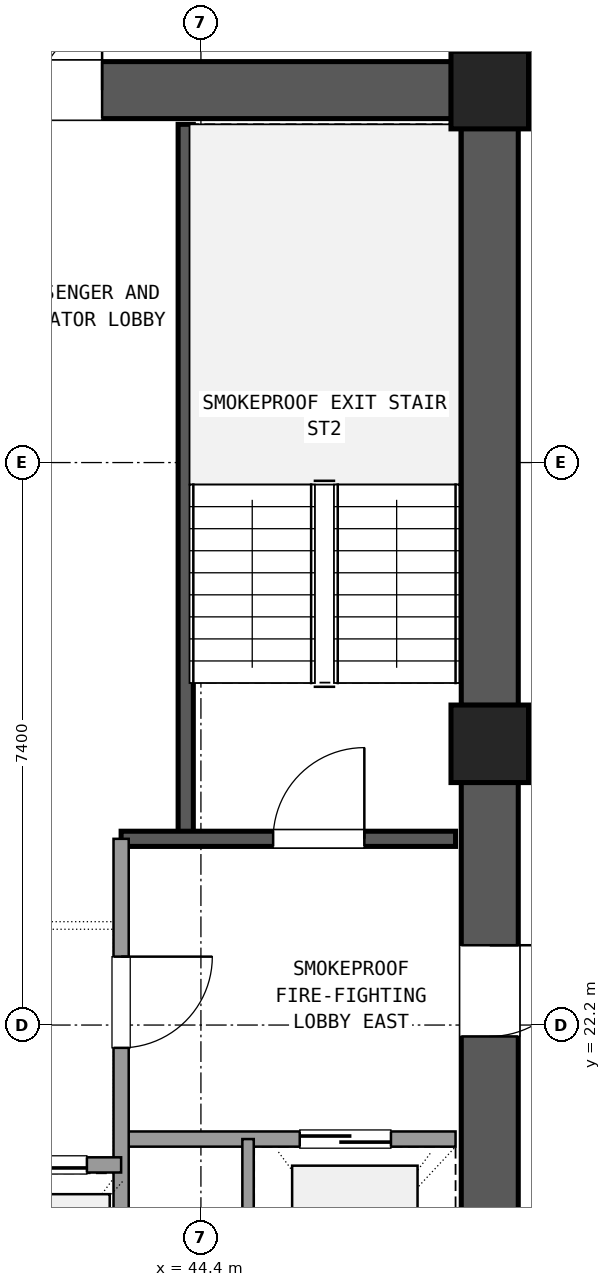
"""IFC4 building model, lengths in metres.
Left out: names, types, materials, properties, quantities, classifications, styles, units other than length and angle.
Written with IfcOpenShell. Run it as: python <this file> out.ifc"""

import sys

from ifc_helpers import new_model, si_unit, direction, frame, frame_2d, origin, origin_2d, place, context, subcontext, project, spatial, rectangle, extrude, element, fill, save


model = new_model("IFC4")
c1 = context("Model", 3, precision=1e-05, world=origin(), true_north=direction((0.0, 1.0)))
c2 = subcontext(c1, "Body", "Model", "MODEL_VIEW")
j1 = project(units=[si_unit("LENGTHUNIT", "METRE"), si_unit("PLANEANGLEUNIT", "RADIAN")], contexts=[c1])
p1 = place(None, origin())
s1 = spatial("IfcSite", under=j1, at=p1, CompositionType="ELEMENT")
p2 = place(p1, origin())
s2 = spatial("IfcBuilding", under=s1, at=p2, CompositionType="ELEMENT")
p3 = place(p2, frame((0.0, 0.0, 113.58)))
s3 = spatial("IfcBuildingStorey", under=s2, at=p3, CompositionType="ELEMENT", Elevation=113.58)
for number, where, z_axis, x_axis in (
    (1, (48.2, 25.9, 0.0), (0.0, 0.0, 1.0), (1.0, 0.0, 0.0)),
    (2, (48.2, 34.5, 0.0), (0.0, 0.0, 1.0), (1.0, 0.0, 0.0)),
):
    element("IfcColumn", number, at=place(p3, frame(where, z_axis=z_axis, x_axis=x_axis)), inside=s3, PredefinedType="COLUMN", context=c2, shape_type="SweptSolid", body=[
        extrude(rectangle(XDim=1.02, YDim=1.02, at=origin_2d()), origin(), (0.0, 0.0, 1.0), 3.6),
    ])
p4 = place(p3, frame((48.2, 17.805, 0.0), z_axis=(0.0, 0.0, 1.0), x_axis=(0.0, 1.0, 0.0)))
e3 = element("IfcWall", 3, at=p4, inside=s3, PredefinedType="SHEAR", context=c2, shape_type="SweptSolid", body=[
    extrude(rectangle(XDim=7.59, YDim=0.75, at=frame_2d((3.795, 0.0))), origin(), (0.0, 0.0, 1.0), 3.32),
])
p5 = place(p4, frame((4.245, 0.0, 0.0)))
e4 = element("IfcOpeningElement", 4, at=p5, cuts=e3, PredefinedType="OPENING", context=c2, shape_type="SweptSolid", body=[
    extrude(rectangle(XDim=1.2, YDim=2.15, at=frame_2d((0.6, 1.075))), frame((0.0, 0.385, 0.0), z_axis=(0.0, -1.0, 0.0), x_axis=(1.0, 0.0, 0.0)), (0.0, 0.0, 1.0), 0.77),
])
p6 = place(p3, frame((48.2, 26.405, 0.0), z_axis=(0.0, 0.0, 1.0), x_axis=(0.0, 1.0, 0.0)))
e5 = element("IfcWall", 5, at=p6, inside=s3, PredefinedType="SHEAR", context=c2, shape_type="SweptSolid", body=[
    extrude(rectangle(XDim=7.59, YDim=0.75, at=frame_2d((3.795, 0.0))), origin(), (0.0, 0.0, 1.0), 3.32),
])
p7 = place(p3, frame((47.695, 34.5, 0.0), z_axis=(0.0, 0.0, 1.0), x_axis=(-1.0, 0.0, 0.0)))
e6 = element("IfcWall", 6, at=p7, inside=s3, PredefinedType="SHEAR", context=c2, shape_type="SweptSolid", body=[
    extrude(rectangle(XDim=10.19, YDim=0.75, at=frame_2d((5.095, 0.0))), origin(), (0.0, 0.0, 1.0), 3.32),
])
p8 = place(p7, frame((4.595, 0.0, 0.0)))
e7 = element("IfcOpeningElement", 7, at=p8, cuts=e6, PredefinedType="OPENING", context=c2, shape_type="SweptSolid", body=[
    extrude(rectangle(XDim=1.6, YDim=2.2, at=frame_2d((0.8, 1.1))), frame((0.0, 0.385, 0.0), z_axis=(0.0, -1.0, 0.0), x_axis=(1.0, 0.0, 0.0)), (0.0, 0.0, 1.0), 0.77),
])
p9 = place(p3, frame((44.2, 24.65, 0.0), z_axis=(0.0, 0.0, 1.0), x_axis=(0.0, 1.0, 0.0)))
e8 = element("IfcWall", 8, at=p9, inside=s3, PredefinedType="SHEAR", context=c2, shape_type="SweptSolid", body=[
    extrude(rectangle(XDim=9.4, YDim=0.2, at=frame_2d((4.7, 0.0))), origin(), (0.0, 0.0, 1.0), 3.32),
])
p10 = place(p3, frame((43.35, 24.65, 0.0), z_axis=(0.0, 0.0, 1.0), x_axis=(1.0, 0.0, 0.0)))
e9 = element("IfcWall", 9, at=p10, inside=s3, PredefinedType="SHEAR", context=c2, shape_type="SweptSolid", body=[
    extrude(rectangle(XDim=4.4, YDim=0.2, at=frame_2d((2.2, 0.0))), origin(), (0.0, 0.0, 1.0), 3.32),
])
p11 = place(p10, frame((2.0, 0.0, 0.0)))
e10 = element("IfcOpeningElement", 10, at=p11, cuts=e9, PredefinedType="OPENING", context=c2, shape_type="SweptSolid", body=[
    extrude(rectangle(XDim=1.2, YDim=2.15, at=frame_2d((0.6, 1.075))), frame((0.0, 0.11, 0.0), z_axis=(0.0, -1.0, 0.0), x_axis=(1.0, 0.0, 0.0)), (0.0, 0.0, 1.0), 0.22),
])
p12 = place(p3, frame((43.35, 20.7, 0.0), z_axis=(0.0, 0.0, 1.0), x_axis=(1.0, 0.0, 0.0)))
e11 = element("IfcWall", 11, at=p12, inside=s3, PredefinedType="SOLIDWALL", context=c2, shape_type="SweptSolid", body=[
    extrude(rectangle(XDim=4.4, YDim=0.2, at=frame_2d((2.2, 0.0))), origin(), (0.0, 0.0, 1.0), 2.61),
])
p13 = place(p12, frame((2.35, 0.0, 0.0)))
e12 = element("IfcOpeningElement", 12, at=p13, cuts=e11, PredefinedType="OPENING", context=c2, shape_type="SweptSolid", body=[
    extrude(rectangle(XDim=1.2, YDim=2.15, at=frame_2d((0.6, 1.075))), frame((0.0, 0.11, 0.0), z_axis=(0.0, -1.0, 0.0), x_axis=(1.0, 0.0, 0.0)), (0.0, 0.0, 1.0), 0.22),
])
p14 = place(p3, frame((43.35, 17.75, 0.0), z_axis=(0.0, 0.0, 1.0), x_axis=(0.0, 1.0, 0.0)))
e13 = element("IfcWall", 13, at=p14, inside=s3, PredefinedType="SOLIDWALL", context=c2, shape_type="SweptSolid", body=[
    extrude(rectangle(XDim=6.9, YDim=0.2, at=frame_2d((3.45, 0.0))), origin(), (0.0, 0.0, 1.0), 2.61),
])
p15 = place(p14, frame((4.15, 0.0, 0.0)))
e14 = element("IfcOpeningElement", 14, at=p15, cuts=e13, PredefinedType="OPENING", context=c2, shape_type="SweptSolid", body=[
    extrude(rectangle(XDim=1.2, YDim=2.15, at=frame_2d((0.6, 1.075))), frame((0.0, 0.11, 0.0), z_axis=(0.0, -1.0, 0.0), x_axis=(1.0, 0.0, 0.0)), (0.0, 0.0, 1.0), 0.22),
])
p16 = place(p3, frame((45.02, 17.75, 0.0), z_axis=(0.0, 0.0, 1.0), x_axis=(0.0, 1.0, 0.0)))
e15 = element("IfcWall", 15, at=p16, inside=s3, PredefinedType="PARTITIONING", context=c2, shape_type="SweptSolid", body=[
    extrude(rectangle(XDim=2.95, YDim=0.15, at=frame_2d((1.475, 0.0))), origin(), (0.0, 0.0, 1.0), 2.61),
])
p17 = place(p3, frame((37.25, 20.36, 0.0), z_axis=(0.0, 0.0, 1.0), x_axis=(1.0, 0.0, 0.0)))
e16 = element("IfcWall", 16, at=p17, inside=s3, PredefinedType="SOLIDWALL", context=c2, shape_type="SweptSolid", body=[
    extrude(rectangle(XDim=6.1, YDim=0.2, at=frame_2d((3.05, 0.0))), origin(), (0.0, 0.0, 1.0), 2.61),
])
p18 = place(p17, frame((0.45, 0.0, 0.0)))
e17 = element("IfcOpeningElement", 17, at=p18, cuts=e16, PredefinedType="OPENING", context=c2, shape_type="SweptSolid", body=[
    extrude(rectangle(XDim=1.1, YDim=2.15, at=frame_2d((0.55, 1.075))), frame((0.0, 0.11, 0.0), z_axis=(0.0, -1.0, 0.0), x_axis=(1.0, 0.0, 0.0)), (0.0, 0.0, 1.0), 0.22),
])
p19 = place(p17, frame((2.5, 0.0, 0.0)))
e18 = element("IfcOpeningElement", 18, at=p19, cuts=e16, PredefinedType="OPENING", context=c2, shape_type="SweptSolid", body=[
    extrude(rectangle(XDim=1.1, YDim=2.15, at=frame_2d((0.55, 1.075))), frame((0.0, 0.11, 0.0), z_axis=(0.0, -1.0, 0.0), x_axis=(1.0, 0.0, 0.0)), (0.0, 0.0, 1.0), 0.22),
])
p20 = place(p17, frame((4.55, 0.0, 0.0)))
e19 = element("IfcOpeningElement", 19, at=p20, cuts=e16, PredefinedType="OPENING", context=c2, shape_type="SweptSolid", body=[
    extrude(rectangle(XDim=1.1, YDim=2.15, at=frame_2d((0.55, 1.075))), frame((0.0, 0.11, 0.0), z_axis=(0.0, -1.0, 0.0), x_axis=(1.0, 0.0, 0.0)), (0.0, 0.0, 1.0), 0.22),
])
p21 = place(p11, origin())
e20 = element("IfcDoor", 20, at=p21, inside=s3, OperationType="SINGLE_SWING_RIGHT", PredefinedType="DOOR", context=c2, shape_type="SweptSolid", body=[
    extrude(rectangle(XDim=1.2, YDim=2.15, at=frame_2d((0.6, 1.075))), frame((0.0, 0.025, 0.0), z_axis=(0.0, -1.0, 0.0), x_axis=(1.0, 0.0, 0.0)), (0.0, 0.0, 1.0), 0.05),
])
fill(e10, e20)
p22 = place(p13, origin())
e21 = element("IfcDoor", 21, at=p22, inside=s3, OperationType="SLIDING_TO_RIGHT", PredefinedType="DOOR", context=c2, shape_type="SweptSolid", body=[
    extrude(rectangle(XDim=1.2, YDim=2.15, at=frame_2d((0.6, 1.075))), frame((0.0, 0.025, 0.0), z_axis=(0.0, -1.0, 0.0), x_axis=(1.0, 0.0, 0.0)), (0.0, 0.0, 1.0), 0.05),
])
fill(e12, e21)
p23 = place(p15, frame((1.2, 0.0, 0.0), z_axis=(0.0, 0.0, 1.0), x_axis=(-1.0, 0.0, 0.0)))
e22 = element("IfcDoor", 22, at=p23, inside=s3, OperationType="SINGLE_SWING_RIGHT", PredefinedType="DOOR", context=c2, shape_type="SweptSolid", body=[
    extrude(rectangle(XDim=1.2, YDim=2.15, at=frame_2d((0.6, 1.075))), frame((0.0, 0.025, 0.0), z_axis=(0.0, -1.0, 0.0), x_axis=(1.0, 0.0, 0.0)), (0.0, 0.0, 1.0), 0.05),
])
fill(e14, e22)
p24 = place(p5, frame((1.2, 0.0, 0.0), z_axis=(0.0, 0.0, 1.0), x_axis=(-1.0, 0.0, 0.0)))
e23 = element("IfcDoor", 23, at=p24, inside=s3, OperationType="SINGLE_SWING_RIGHT", PredefinedType="DOOR", context=c2, shape_type="SweptSolid", body=[
    extrude(rectangle(XDim=1.2, YDim=2.15, at=frame_2d((0.6, 1.075))), frame((0.0, 0.025, 0.0), z_axis=(0.0, -1.0, 0.0), x_axis=(1.0, 0.0, 0.0)), (0.0, 0.0, 1.0), 0.05),
])
fill(e4, e23)
p25 = place(p8, frame((1.6, 0.0, 0.0), z_axis=(0.0, 0.0, 1.0), x_axis=(-1.0, 0.0, 0.0)))
e24 = element("IfcDoor", 24, at=p25, inside=s3, OperationType="DOUBLE_DOOR_SINGLE_SWING", PredefinedType="DOOR", context=c2, shape_type="SweptSolid", body=[
    extrude(rectangle(XDim=1.6, YDim=2.2, at=frame_2d((0.8, 1.1))), frame((0.0, 0.025, 0.0), z_axis=(0.0, -1.0, 0.0), x_axis=(1.0, 0.0, 0.0)), (0.0, 0.0, 1.0), 0.05),
])
fill(e7, e24)
p26 = place(p20, origin())
e25 = element("IfcDoor", 25, at=p26, inside=s3, OperationType="SLIDING_TO_LEFT", PredefinedType="DOOR", context=c2, shape_type="SweptSolid", body=[
    extrude(rectangle(XDim=1.1, YDim=2.15, at=frame_2d((0.55, 1.075))), frame((0.0, 0.025, 0.0), z_axis=(0.0, -1.0, 0.0), x_axis=(1.0, 0.0, 0.0)), (0.0, 0.0, 1.0), 0.05),
])
fill(e19, e25)
save(model, sys.argv[1])
